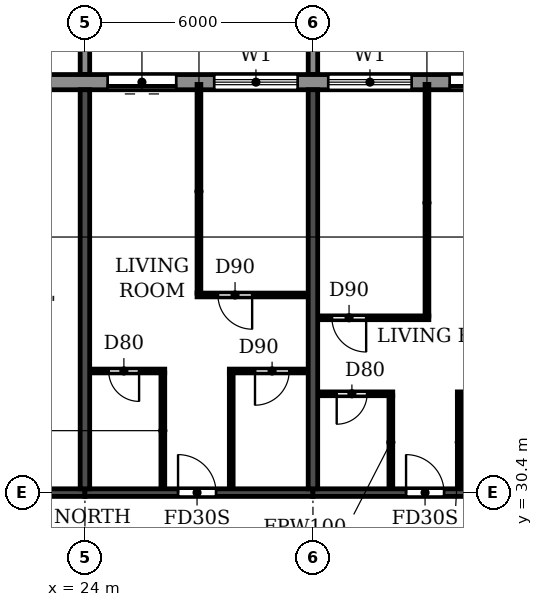
"""IFC4 building model, lengths in metres.
Left out: names, types, materials, properties, quantities, classifications, styles, units other than length and angle.
Written with IfcOpenShell. Run it as: python <this file> out.ifc"""

import sys

from ifc_helpers import new_model, si_unit, direction, frame, frame_2d, origin, place, context, subcontext, project, spatial, polyline, rectangle, outline, extrude, source, transform, mapped, element, fill, save


model = new_model("IFC4")
c1 = context("Model", 3, precision=1e-05, world=origin(), true_north=direction((0.0, 1.0)))
c2 = subcontext(c1, "Body", "Model", "MODEL_VIEW")
j1 = project(units=[si_unit("LENGTHUNIT", "METRE"), si_unit("PLANEANGLEUNIT", "RADIAN")], contexts=[c1])
p1 = place(None, origin())
s1 = spatial("IfcSite", under=j1, at=p1, CompositionType="ELEMENT")
p2 = place(p1, origin())
s2 = spatial("IfcBuilding", under=s1, at=p2, CompositionType="ELEMENT")
p3 = place(p2, frame((0.0, 0.0, 181.8)))
s3 = spatial("IfcBuildingStorey", under=s2, at=p3, CompositionType="ELEMENT", Elevation=181.8)
for number, where, z_axis, x_axis in (
    (1, (24.0, 30.5, 0.0), (0.0, 0.0, 1.0), (0.0, 1.0, 0.0)),
    (2, (30.0, 30.5, 0.0), (0.0, 0.0, 1.0), (0.0, 1.0, 0.0)),
):
    element("IfcWall", number, at=place(p3, frame(where, z_axis=z_axis, x_axis=x_axis)), inside=s3, PredefinedType="SHEAR", context=c2, shape_type="SweptSolid", body=[
        extrude(rectangle(XDim=10.5, YDim=0.25, at=frame_2d((5.25, 0.0))), origin(), (0.0, 0.0, 1.0), 3.08),
    ])
p4 = place(p3, frame((18.2, 30.4, 0.0), z_axis=(0.0, 0.0, 1.0), x_axis=(1.0, 0.0, 0.0)))
e3 = element("IfcWall", 3, at=p4, inside=s3, PredefinedType="SHEAR", context=c2, shape_type="SweptSolid", body=[
    extrude(rectangle(XDim=5.8, YDim=0.2, at=frame_2d((2.9, 0.0))), origin(), (0.0, 0.0, 1.0), 2.48),
])
p5 = place(p4, frame((2.3, 0.0, 0.0)))
e4 = element("IfcOpeningElement", 4, at=p5, cuts=e3, PredefinedType="OPENING", context=c2, shape_type="SweptSolid", body=[
    extrude(rectangle(XDim=1.0, YDim=2.1, at=frame_2d((0.5, 1.05))), frame((0.0, 0.11, 0.0), z_axis=(0.0, -1.0, 0.0), x_axis=(1.0, 0.0, 0.0)), (0.0, 0.0, 1.0), 0.22),
])
p6 = place(p3, frame((24.0, 30.4, 0.0), z_axis=(0.0, 0.0, 1.0), x_axis=(1.0, 0.0, 0.0)))
e5 = element("IfcWall", 5, at=p6, inside=s3, PredefinedType="SHEAR", context=c2, shape_type="SweptSolid", body=[
    extrude(rectangle(XDim=6.0, YDim=0.2, at=frame_2d((3.0, 0.0))), origin(), (0.0, 0.0, 1.0), 2.48),
])
p7 = place(p6, frame((2.45, 0.0, 0.0)))
e6 = element("IfcOpeningElement", 6, at=p7, cuts=e5, PredefinedType="OPENING", context=c2, shape_type="SweptSolid", body=[
    extrude(rectangle(XDim=1.0, YDim=2.1, at=frame_2d((0.5, 1.05))), frame((0.0, 0.11, 0.0), z_axis=(0.0, -1.0, 0.0), x_axis=(1.0, 0.0, 0.0)), (0.0, 0.0, 1.0), 0.22),
])
p8 = place(p3, frame((30.0, 30.4, 0.0), z_axis=(0.0, 0.0, 1.0), x_axis=(1.0, 0.0, 0.0)))
e7 = element("IfcWall", 7, at=p8, inside=s3, PredefinedType="SHEAR", context=c2, shape_type="SweptSolid", body=[
    extrude(rectangle(XDim=6.0, YDim=0.2, at=frame_2d((3.0, 0.0))), origin(), (0.0, 0.0, 1.0), 2.48),
])
p9 = place(p8, frame((2.45, 0.0, 0.0)))
e8 = element("IfcOpeningElement", 8, at=p9, cuts=e7, PredefinedType="OPENING", context=c2, shape_type="SweptSolid", body=[
    extrude(rectangle(XDim=1.0, YDim=2.1, at=frame_2d((0.5, 1.05))), frame((0.0, 0.11, 0.0), z_axis=(0.0, -1.0, 0.0), x_axis=(1.0, 0.0, 0.0)), (0.0, 0.0, 1.0), 0.22),
])
p10 = place(p3, frame((79.317, 41.2, 0.0), z_axis=(0.0, 0.0, 1.0), x_axis=(-1.0, 0.0, 0.0)))
e9 = element("IfcWall", 9, at=p10, inside=s3, PredefinedType="STANDARD", context=c2, shape_type="SweptSolid", body=[
    extrude(rectangle(XDim=56.634, YDim=0.4, at=frame_2d((28.317, 0.0))), origin(), (0.0, 0.0, 1.0), 3.08),
])
p11 = place(p10, frame((52.917, 0.0, 0.0)))
e10 = element("IfcOpeningElement", 10, at=p11, cuts=e9, PredefinedType="OPENING", context=c2, shape_type="SweptSolid", body=[
    extrude(rectangle(XDim=1.8, YDim=2.4, at=frame_2d((0.9, 1.2))), frame((0.0, 0.21, 0.0), z_axis=(0.0, -1.0, 0.0), x_axis=(1.0, 0.0, 0.0)), (0.0, 0.0, 1.0), 0.42),
])
p12 = place(p10, frame((49.717, 0.0, 0.9)))
e11 = element("IfcOpeningElement", 11, at=p12, cuts=e9, PredefinedType="OPENING", context=c2, shape_type="SweptSolid", body=[
    extrude(rectangle(XDim=2.2, YDim=1.5, at=frame_2d((1.1, 0.75))), frame((0.0, 0.21, 0.0), z_axis=(0.0, -1.0, 0.0), x_axis=(1.0, 0.0, 0.0)), (0.0, 0.0, 1.0), 0.42),
])
p13 = place(p10, frame((46.717, 0.0, 0.9)))
e12 = element("IfcOpeningElement", 12, at=p13, cuts=e9, PredefinedType="OPENING", context=c2, shape_type="SweptSolid", body=[
    extrude(rectangle(XDim=2.2, YDim=1.5, at=frame_2d((1.1, 0.75))), frame((0.0, 0.21, 0.0), z_axis=(0.0, -1.0, 0.0), x_axis=(1.0, 0.0, 0.0)), (0.0, 0.0, 1.0), 0.42),
])
p14 = place(p10, frame((43.917, 0.0, 0.0)))
e13 = element("IfcOpeningElement", 13, at=p14, cuts=e9, PredefinedType="OPENING", context=c2, shape_type="SweptSolid", body=[
    extrude(rectangle(XDim=1.8, YDim=2.4, at=frame_2d((0.9, 1.2))), frame((0.0, 0.21, 0.0), z_axis=(0.0, -1.0, 0.0), x_axis=(1.0, 0.0, 0.0)), (0.0, 0.0, 1.0), 0.42),
])
p15 = place(p10, frame((40.717, 0.0, 0.9)))
e14 = element("IfcOpeningElement", 14, at=p15, cuts=e9, PredefinedType="OPENING", context=c2, shape_type="SweptSolid", body=[
    extrude(rectangle(XDim=2.2, YDim=1.5, at=frame_2d((1.1, 0.75))), frame((0.0, 0.21, 0.0), z_axis=(0.0, -1.0, 0.0), x_axis=(1.0, 0.0, 0.0)), (0.0, 0.0, 1.0), 0.42),
])
p16 = place(p10, frame((37.717, 0.0, 0.9)))
e15 = element("IfcOpeningElement", 15, at=p16, cuts=e9, PredefinedType="OPENING", context=c2, shape_type="SweptSolid", body=[
    extrude(rectangle(XDim=2.2, YDim=1.5, at=frame_2d((1.1, 0.75))), frame((0.0, 0.21, 0.0), z_axis=(0.0, -1.0, 0.0), x_axis=(1.0, 0.0, 0.0)), (0.0, 0.0, 1.0), 0.42),
])
p17 = place(p10, frame((34.917, 0.0, 0.0)))
e16 = element("IfcOpeningElement", 16, at=p17, cuts=e9, PredefinedType="OPENING", context=c2, shape_type="SweptSolid", body=[
    extrude(rectangle(XDim=1.8, YDim=2.4, at=frame_2d((0.9, 1.2))), frame((0.0, 0.21, 0.0), z_axis=(0.0, -1.0, 0.0), x_axis=(1.0, 0.0, 0.0)), (0.0, 0.0, 1.0), 0.42),
])
p18 = place(p10, frame((31.717, 0.0, 0.9)))
e17 = element("IfcOpeningElement", 17, at=p18, cuts=e9, PredefinedType="OPENING", context=c2, shape_type="SweptSolid", body=[
    extrude(rectangle(XDim=2.2, YDim=1.5, at=frame_2d((1.1, 0.75))), frame((0.0, 0.21, 0.0), z_axis=(0.0, -1.0, 0.0), x_axis=(1.0, 0.0, 0.0)), (0.0, 0.0, 1.0), 0.42),
])
p19 = place(p10, frame((28.717, 0.0, 0.9)))
e18 = element("IfcOpeningElement", 18, at=p19, cuts=e9, PredefinedType="OPENING", context=c2, shape_type="SweptSolid", body=[
    extrude(rectangle(XDim=2.2, YDim=1.5, at=frame_2d((1.1, 0.75))), frame((0.0, 0.21, 0.0), z_axis=(0.0, -1.0, 0.0), x_axis=(1.0, 0.0, 0.0)), (0.0, 0.0, 1.0), 0.42),
])
p20 = place(p10, frame((25.717, 0.0, 0.9)))
e19 = element("IfcOpeningElement", 19, at=p20, cuts=e9, PredefinedType="OPENING", context=c2, shape_type="SweptSolid", body=[
    extrude(rectangle(XDim=2.2, YDim=1.5, at=frame_2d((1.1, 0.75))), frame((0.0, 0.21, 0.0), z_axis=(0.0, -1.0, 0.0), x_axis=(1.0, 0.0, 0.0)), (0.0, 0.0, 1.0), 0.42),
])
p21 = place(p10, frame((22.917, 0.0, 0.0)))
e20 = element("IfcOpeningElement", 20, at=p21, cuts=e9, PredefinedType="OPENING", context=c2, shape_type="SweptSolid", body=[
    extrude(rectangle(XDim=1.8, YDim=2.4, at=frame_2d((0.9, 1.2))), frame((0.0, 0.21, 0.0), z_axis=(0.0, -1.0, 0.0), x_axis=(1.0, 0.0, 0.0)), (0.0, 0.0, 1.0), 0.42),
])
p22 = place(p10, frame((19.717, 0.0, 0.9)))
e21 = element("IfcOpeningElement", 21, at=p22, cuts=e9, PredefinedType="OPENING", context=c2, shape_type="SweptSolid", body=[
    extrude(rectangle(XDim=2.2, YDim=1.5, at=frame_2d((1.1, 0.75))), frame((0.0, 0.21, 0.0), z_axis=(0.0, -1.0, 0.0), x_axis=(1.0, 0.0, 0.0)), (0.0, 0.0, 1.0), 0.42),
])
p23 = place(p10, frame((16.917, 0.0, 0.0)))
e22 = element("IfcOpeningElement", 22, at=p23, cuts=e9, PredefinedType="OPENING", context=c2, shape_type="SweptSolid", body=[
    extrude(rectangle(XDim=1.8, YDim=2.4, at=frame_2d((0.9, 1.2))), frame((0.0, 0.21, 0.0), z_axis=(0.0, -1.0, 0.0), x_axis=(1.0, 0.0, 0.0)), (0.0, 0.0, 1.0), 0.42),
])
p24 = place(p10, frame((13.717, 0.0, 0.9)))
e23 = element("IfcOpeningElement", 23, at=p24, cuts=e9, PredefinedType="OPENING", context=c2, shape_type="SweptSolid", body=[
    extrude(rectangle(XDim=2.2, YDim=1.5, at=frame_2d((1.1, 0.75))), frame((0.0, 0.21, 0.0), z_axis=(0.0, -1.0, 0.0), x_axis=(1.0, 0.0, 0.0)), (0.0, 0.0, 1.0), 0.42),
])
p25 = place(p10, frame((10.917, 0.0, 0.0)))
e24 = element("IfcOpeningElement", 24, at=p25, cuts=e9, PredefinedType="OPENING", context=c2, shape_type="SweptSolid", body=[
    extrude(rectangle(XDim=1.8, YDim=2.4, at=frame_2d((0.9, 1.2))), frame((0.0, 0.21, 0.0), z_axis=(0.0, -1.0, 0.0), x_axis=(1.0, 0.0, 0.0)), (0.0, 0.0, 1.0), 0.42),
])
p26 = place(p10, frame((7.717, 0.0, 0.9)))
e25 = element("IfcOpeningElement", 25, at=p26, cuts=e9, PredefinedType="OPENING", context=c2, shape_type="SweptSolid", body=[
    extrude(rectangle(XDim=2.2, YDim=1.5, at=frame_2d((1.1, 0.75))), frame((0.0, 0.21, 0.0), z_axis=(0.0, -1.0, 0.0), x_axis=(1.0, 0.0, 0.0)), (0.0, 0.0, 1.0), 0.42),
])
p27 = place(p10, frame((4.717, 0.0, 0.9)))
e26 = element("IfcOpeningElement", 26, at=p27, cuts=e9, PredefinedType="OPENING", context=c2, shape_type="SweptSolid", body=[
    extrude(rectangle(XDim=2.2, YDim=1.5, at=frame_2d((1.1, 0.75))), frame((0.0, 0.21, 0.0), z_axis=(0.0, -1.0, 0.0), x_axis=(1.0, 0.0, 0.0)), (0.0, 0.0, 1.0), 0.42),
])
p28 = place(p10, frame((1.917, 0.0, 0.0)))
e27 = element("IfcOpeningElement", 27, at=p28, cuts=e9, PredefinedType="OPENING", context=c2, shape_type="SweptSolid", body=[
    extrude(rectangle(XDim=1.8, YDim=2.4, at=frame_2d((0.9, 1.2))), frame((0.0, 0.21, 0.0), z_axis=(0.0, -1.0, 0.0), x_axis=(1.0, 0.0, 0.0)), (0.0, 0.0, 1.0), 0.42),
])
m1 = source(origin(), c2, "Body", "SweptSolid", [
    extrude(outline(polyline([(0.0, 0.0), (0.25, 0.0), (0.25, 3.1), (0.0, 3.1), (0.0, 0.0)])), origin(), (0.0, 0.0, 1.0), 3.1),
])
for number, where in (
    (28, (23.875, 41.4, 0.0)),
    (29, (29.875, 41.4, 0.0)),
):
    element("IfcWall", number, at=place(p3, frame(where)), inside=s3, PredefinedType="STANDARD", context=c2, shape_type="MappedRepresentation", body=[
        mapped(m1, transform((0.0, 0.0, 0.0))),
    ])
p29 = place(p3, frame((30.135, 33.0, 0.0), z_axis=(0.0, 0.0, 1.0), x_axis=(1.0, 0.0, 0.0)))
e30 = element("IfcWall", 30, at=p29, inside=s3, PredefinedType="PARTITIONING", context=c2, shape_type="SweptSolid", body=[
    extrude(rectangle(XDim=1.965, YDim=0.1, at=frame_2d((0.982, 0.0))), origin(), (0.0, 0.0, 1.0), 3.08),
])
p30 = place(p29, frame((0.49, 0.0, 0.0)))
e31 = element("IfcOpeningElement", 31, at=p30, cuts=e30, PredefinedType="OPENING", context=c2, shape_type="SweptSolid", body=[
    extrude(rectangle(XDim=0.8, YDim=2.1, at=frame_2d((0.4, 1.05))), frame((0.0, 0.06, 0.0), z_axis=(0.0, -1.0, 0.0), x_axis=(1.0, 0.0, 0.0)), (0.0, 0.0, 1.0), 0.12),
])
p31 = place(p3, frame((33.8, 33.0, 0.0), z_axis=(0.0, 0.0, 1.0), x_axis=(1.0, 0.0, 0.0)))
e32 = element("IfcWall", 32, at=p31, inside=s3, PredefinedType="PARTITIONING", context=c2, shape_type="SweptSolid", body=[
    extrude(rectangle(XDim=2.065, YDim=0.1, at=frame_2d((1.032, 0.0))), origin(), (0.0, 0.0, 1.0), 3.08),
])
p32 = place(p31, frame((0.675, 0.0, 0.0)))
e33 = element("IfcOpeningElement", 33, at=p32, cuts=e32, PredefinedType="OPENING", context=c2, shape_type="SweptSolid", body=[
    extrude(rectangle(XDim=0.9, YDim=2.1, at=frame_2d((0.45, 1.05))), frame((0.0, 0.06, 0.0), z_axis=(0.0, -1.0, 0.0), x_axis=(1.0, 0.0, 0.0)), (0.0, 0.0, 1.0), 0.12),
])
p33 = place(p3, frame((24.135, 33.6, 0.0), z_axis=(0.0, 0.0, 1.0), x_axis=(1.0, 0.0, 0.0)))
e34 = element("IfcWall", 34, at=p33, inside=s3, PredefinedType="PARTITIONING", context=c2, shape_type="SweptSolid", body=[
    extrude(rectangle(XDim=1.965, YDim=0.1, at=frame_2d((0.982, 0.0))), origin(), (0.0, 0.0, 1.0), 3.08),
])
p34 = place(p33, frame((0.49, 0.0, 0.0)))
e35 = element("IfcOpeningElement", 35, at=p34, cuts=e34, PredefinedType="OPENING", context=c2, shape_type="SweptSolid", body=[
    extrude(rectangle(XDim=0.8, YDim=2.1, at=frame_2d((0.4, 1.05))), frame((0.0, 0.06, 0.0), z_axis=(0.0, -1.0, 0.0), x_axis=(1.0, 0.0, 0.0)), (0.0, 0.0, 1.0), 0.12),
])
p35 = place(p3, frame((27.8, 33.6, 0.0), z_axis=(0.0, 0.0, 1.0), x_axis=(1.0, 0.0, 0.0)))
e36 = element("IfcWall", 36, at=p35, inside=s3, PredefinedType="PARTITIONING", context=c2, shape_type="SweptSolid", body=[
    extrude(rectangle(XDim=2.065, YDim=0.1, at=frame_2d((1.032, 0.0))), origin(), (0.0, 0.0, 1.0), 3.08),
])
p36 = place(p35, frame((0.675, 0.0, 0.0)))
e37 = element("IfcOpeningElement", 37, at=p36, cuts=e36, PredefinedType="OPENING", context=c2, shape_type="SweptSolid", body=[
    extrude(rectangle(XDim=0.9, YDim=2.1, at=frame_2d((0.45, 1.05))), frame((0.0, 0.06, 0.0), z_axis=(0.0, -1.0, 0.0), x_axis=(1.0, 0.0, 0.0)), (0.0, 0.0, 1.0), 0.12),
])
p37 = place(p3, frame((30.135, 35.0, 0.0), z_axis=(0.0, 0.0, 1.0), x_axis=(1.0, 0.0, 0.0)))
e38 = element("IfcWall", 38, at=p37, inside=s3, PredefinedType="PARTITIONING", context=c2, shape_type="SweptSolid", body=[
    extrude(rectangle(XDim=2.915, YDim=0.1, at=frame_2d((1.458, 0.0))), origin(), (0.0, 0.0, 1.0), 3.08),
])
p38 = place(p37, frame((0.365, 0.0, 0.0)))
e39 = element("IfcOpeningElement", 39, at=p38, cuts=e38, PredefinedType="OPENING", context=c2, shape_type="SweptSolid", body=[
    extrude(rectangle(XDim=0.9, YDim=2.1, at=frame_2d((0.45, 1.05))), frame((0.0, 0.06, 0.0), z_axis=(0.0, -1.0, 0.0), x_axis=(1.0, 0.0, 0.0)), (0.0, 0.0, 1.0), 0.12),
])
p39 = place(p3, frame((26.95, 35.6, 0.0), z_axis=(0.0, 0.0, 1.0), x_axis=(1.0, 0.0, 0.0)))
e40 = element("IfcWall", 40, at=p39, inside=s3, PredefinedType="PARTITIONING", context=c2, shape_type="SweptSolid", body=[
    extrude(rectangle(XDim=2.915, YDim=0.1, at=frame_2d((1.458, 0.0))), origin(), (0.0, 0.0, 1.0), 3.08),
])
p40 = place(p39, frame((0.55, 0.0, 0.0)))
e41 = element("IfcOpeningElement", 41, at=p40, cuts=e40, PredefinedType="OPENING", context=c2, shape_type="SweptSolid", body=[
    extrude(rectangle(XDim=0.9, YDim=2.1, at=frame_2d((0.45, 1.05))), frame((0.0, 0.06, 0.0), z_axis=(0.0, -1.0, 0.0), x_axis=(1.0, 0.0, 0.0)), (0.0, 0.0, 1.0), 0.12),
])
p41 = place(p3, frame((26.05, 30.51, 0.0), z_axis=(0.0, 0.0, 1.0), x_axis=(0.0, 1.0, 0.0)))
e42 = element("IfcWall", 42, at=p41, inside=s3, PredefinedType="PARTITIONING", context=c2, shape_type="SweptSolid", body=[
    extrude(rectangle(XDim=3.04, YDim=0.1, at=frame_2d((1.52, 0.0))), origin(), (0.0, 0.0, 1.0), 3.08),
])
p42 = place(p3, frame((27.0, 35.65, 0.0), z_axis=(0.0, 0.0, 1.0), x_axis=(0.0, 1.0, 0.0)))
e43 = element("IfcWall", 43, at=p42, inside=s3, PredefinedType="PARTITIONING", context=c2, shape_type="SweptSolid", body=[
    extrude(rectangle(XDim=5.49, YDim=0.1, at=frame_2d((2.745, 0.0))), origin(), (0.0, 0.0, 1.0), 3.08),
])
p43 = place(p3, frame((27.85, 30.51, 0.0), z_axis=(0.0, 0.0, 1.0), x_axis=(0.0, 1.0, 0.0)))
e44 = element("IfcWall", 44, at=p43, inside=s3, PredefinedType="PARTITIONING", context=c2, shape_type="SweptSolid", body=[
    extrude(rectangle(XDim=3.04, YDim=0.1, at=frame_2d((1.52, 0.0))), origin(), (0.0, 0.0, 1.0), 3.08),
])
p44 = place(p3, frame((32.05, 30.51, 0.0), z_axis=(0.0, 0.0, 1.0), x_axis=(0.0, 1.0, 0.0)))
e45 = element("IfcWall", 45, at=p44, inside=s3, PredefinedType="PARTITIONING", context=c2, shape_type="SweptSolid", body=[
    extrude(rectangle(XDim=2.44, YDim=0.1, at=frame_2d((1.22, 0.0))), origin(), (0.0, 0.0, 1.0), 3.08),
])
p45 = place(p3, frame((33.0, 35.05, 0.0), z_axis=(0.0, 0.0, 1.0), x_axis=(0.0, 1.0, 0.0)))
e46 = element("IfcWall", 46, at=p45, inside=s3, PredefinedType="PARTITIONING", context=c2, shape_type="SweptSolid", body=[
    extrude(rectangle(XDim=6.09, YDim=0.1, at=frame_2d((3.045, 0.0))), origin(), (0.0, 0.0, 1.0), 3.08),
])
p46 = place(p3, frame((33.85, 30.51, 0.0), z_axis=(0.0, 0.0, 1.0), x_axis=(0.0, 1.0, 0.0)))
e47 = element("IfcWall", 47, at=p46, inside=s3, PredefinedType="PARTITIONING", context=c2, shape_type="SweptSolid", body=[
    extrude(rectangle(XDim=2.44, YDim=0.1, at=frame_2d((1.22, 0.0))), origin(), (0.0, 0.0, 1.0), 3.08),
])
p47 = place(p11, origin())
e48 = element("IfcDoor", 48, at=p47, inside=s3, OperationType="DOUBLE_DOOR_SLIDING", PredefinedType="DOOR", context=c2, shape_type="SweptSolid", body=[
    extrude(rectangle(XDim=1.8, YDim=2.4, at=frame_2d((0.9, 1.2))), frame((0.0, 0.025, 0.0), z_axis=(0.0, -1.0, 0.0), x_axis=(1.0, 0.0, 0.0)), (0.0, 0.0, 1.0), 0.05),
])
fill(e10, e48)
p48 = place(p12, origin())
e49 = element("IfcWindow", 49, at=p48, inside=s3, PartitioningType="DOUBLE_PANEL_HORIZONTAL", PredefinedType="WINDOW", context=c2, shape_type="SweptSolid", body=[
    extrude(rectangle(XDim=2.2, YDim=1.5, at=frame_2d((1.1, 0.75))), frame((0.0, 0.03, 0.0), z_axis=(0.0, -1.0, 0.0), x_axis=(1.0, 0.0, 0.0)), (0.0, 0.0, 1.0), 0.06),
])
fill(e11, e49)
p49 = place(p13, origin())
e50 = element("IfcWindow", 50, at=p49, inside=s3, PartitioningType="DOUBLE_PANEL_HORIZONTAL", PredefinedType="WINDOW", context=c2, shape_type="SweptSolid", body=[
    extrude(rectangle(XDim=2.2, YDim=1.5, at=frame_2d((1.1, 0.75))), frame((0.0, 0.03, 0.0), z_axis=(0.0, -1.0, 0.0), x_axis=(1.0, 0.0, 0.0)), (0.0, 0.0, 1.0), 0.06),
])
fill(e12, e50)
p50 = place(p14, origin())
e51 = element("IfcDoor", 51, at=p50, inside=s3, OperationType="DOUBLE_DOOR_SLIDING", PredefinedType="DOOR", context=c2, shape_type="SweptSolid", body=[
    extrude(rectangle(XDim=1.8, YDim=2.4, at=frame_2d((0.9, 1.2))), frame((0.0, 0.025, 0.0), z_axis=(0.0, -1.0, 0.0), x_axis=(1.0, 0.0, 0.0)), (0.0, 0.0, 1.0), 0.05),
])
fill(e13, e51)
p51 = place(p34, frame((0.8, 0.0, 0.0), z_axis=(0.0, 0.0, 1.0), x_axis=(-1.0, 0.0, 0.0)))
e52 = element("IfcDoor", 52, at=p51, inside=s3, OperationType="SINGLE_SWING_LEFT", PredefinedType="DOOR", context=c2, shape_type="SweptSolid", body=[
    extrude(rectangle(XDim=0.8, YDim=2.1, at=frame_2d((0.4, 1.05))), frame((0.0, 0.025, 0.0), z_axis=(0.0, -1.0, 0.0), x_axis=(1.0, 0.0, 0.0)), (0.0, 0.0, 1.0), 0.05),
])
fill(e35, e52)
p52 = place(p7, origin())
e53 = element("IfcDoor", 53, at=p52, inside=s3, OperationType="SINGLE_SWING_LEFT", PredefinedType="DOOR", context=c2, shape_type="SweptSolid", body=[
    extrude(rectangle(XDim=1.0, YDim=2.1, at=frame_2d((0.5, 1.05))), frame((0.0, 0.025, 0.0), z_axis=(0.0, -1.0, 0.0), x_axis=(1.0, 0.0, 0.0)), (0.0, 0.0, 1.0), 0.05),
])
fill(e6, e53)
p53 = place(p40, frame((0.9, 0.0, 0.0), z_axis=(0.0, 0.0, 1.0), x_axis=(-1.0, 0.0, 0.0)))
e54 = element("IfcDoor", 54, at=p53, inside=s3, OperationType="SINGLE_SWING_LEFT", PredefinedType="DOOR", context=c2, shape_type="SweptSolid", body=[
    extrude(rectangle(XDim=0.9, YDim=2.1, at=frame_2d((0.45, 1.05))), frame((0.0, 0.025, 0.0), z_axis=(0.0, -1.0, 0.0), x_axis=(1.0, 0.0, 0.0)), (0.0, 0.0, 1.0), 0.05),
])
fill(e41, e54)
p54 = place(p36, frame((0.9, 0.0, 0.0), z_axis=(0.0, 0.0, 1.0), x_axis=(-1.0, 0.0, 0.0)))
e55 = element("IfcDoor", 55, at=p54, inside=s3, OperationType="SINGLE_SWING_RIGHT", PredefinedType="DOOR", context=c2, shape_type="SweptSolid", body=[
    extrude(rectangle(XDim=0.9, YDim=2.1, at=frame_2d((0.45, 1.05))), frame((0.0, 0.025, 0.0), z_axis=(0.0, -1.0, 0.0), x_axis=(1.0, 0.0, 0.0)), (0.0, 0.0, 1.0), 0.05),
])
fill(e37, e55)
p55 = place(p38, frame((0.9, 0.0, 0.0), z_axis=(0.0, 0.0, 1.0), x_axis=(-1.0, 0.0, 0.0)))
e56 = element("IfcDoor", 56, at=p55, inside=s3, OperationType="SINGLE_SWING_LEFT", PredefinedType="DOOR", context=c2, shape_type="SweptSolid", body=[
    extrude(rectangle(XDim=0.9, YDim=2.1, at=frame_2d((0.45, 1.05))), frame((0.0, 0.025, 0.0), z_axis=(0.0, -1.0, 0.0), x_axis=(1.0, 0.0, 0.0)), (0.0, 0.0, 1.0), 0.05),
])
fill(e39, e56)
p56 = place(p30, frame((0.8, 0.0, 0.0), z_axis=(0.0, 0.0, 1.0), x_axis=(-1.0, 0.0, 0.0)))
e57 = element("IfcDoor", 57, at=p56, inside=s3, OperationType="SINGLE_SWING_RIGHT", PredefinedType="DOOR", context=c2, shape_type="SweptSolid", body=[
    extrude(rectangle(XDim=0.8, YDim=2.1, at=frame_2d((0.4, 1.05))), frame((0.0, 0.025, 0.0), z_axis=(0.0, -1.0, 0.0), x_axis=(1.0, 0.0, 0.0)), (0.0, 0.0, 1.0), 0.05),
])
fill(e31, e57)
p57 = place(p9, origin())
e58 = element("IfcDoor", 58, at=p57, inside=s3, OperationType="SINGLE_SWING_LEFT", PredefinedType="DOOR", context=c2, shape_type="SweptSolid", body=[
    extrude(rectangle(XDim=1.0, YDim=2.1, at=frame_2d((0.5, 1.05))), frame((0.0, 0.025, 0.0), z_axis=(0.0, -1.0, 0.0), x_axis=(1.0, 0.0, 0.0)), (0.0, 0.0, 1.0), 0.05),
])
fill(e8, e58)
save(model, sys.argv[1])
